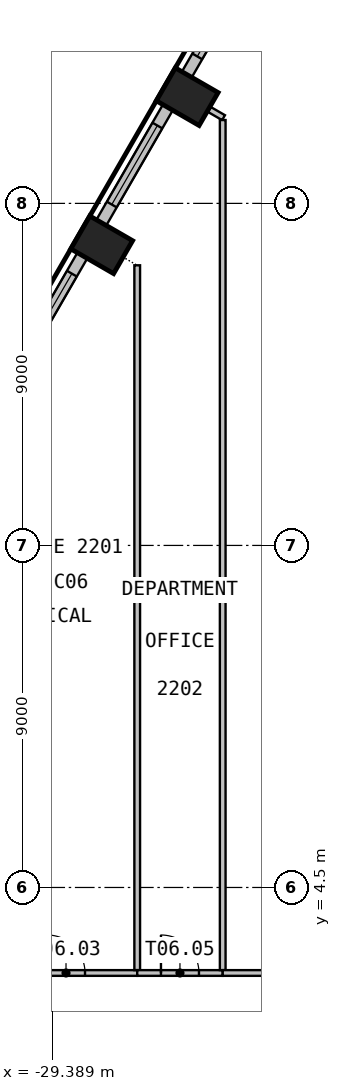
"""IFC4 building model, lengths in metres.
Left out: names, types, materials, properties, quantities, classifications, styles, units other than length and angle.
Written with IfcOpenShell. Run it as: python <this file> out.ifc"""

import sys

from ifc_helpers import new_model, si_unit, direction, frame, frame_2d, origin, origin_2d, place, context, subcontext, project, spatial, rectangle, extrude, element, fill, save


model = new_model("IFC4")
c1 = context("Model", 3, precision=1e-05, world=origin(), true_north=direction((0.0, 1.0)))
c2 = subcontext(c1, "Body", "Model", "MODEL_VIEW")
j1 = project(units=[si_unit("LENGTHUNIT", "METRE"), si_unit("PLANEANGLEUNIT", "RADIAN")], contexts=[c1])
p1 = place(None, origin())
s1 = spatial("IfcSite", under=j1, at=p1, CompositionType="ELEMENT")
p2 = place(p1, origin())
s2 = spatial("IfcBuilding", under=s1, at=p2, CompositionType="ELEMENT")
p3 = place(p2, frame((0.0, 0.0, 93.0)))
s3 = spatial("IfcBuildingStorey", under=s2, at=p3, CompositionType="ELEMENT", Elevation=93.0)
for number, where, z_axis, x_axis in (
    (1, (-25.834, 25.308, 0.0), (0.0, 0.0, 1.0), (-0.5, -0.866, 0.0)),
    (2, (-28.084, 21.411, 0.0), (0.0, 0.0, 1.0), (-0.5, -0.866, 0.0)),
):
    element("IfcColumn", number, at=place(p3, frame(where, z_axis=z_axis, x_axis=x_axis)), inside=s3, PredefinedType="COLUMN", context=c2, shape_type="SweptSolid", body=[
        extrude(rectangle(XDim=1.0, YDim=1.3, at=origin_2d()), origin(), (0.0, 0.0, 1.0), 3.525),
    ])
p4 = place(p3, frame((-24.248, 28.656, 0.0), z_axis=(0.0, 0.0, 1.0), x_axis=(-0.500004907028, -0.866022570692, 0.0)))
e3 = element("IfcWall", 3, at=p4, inside=s3, PredefinedType="SOLIDWALL", context=c2, shape_type="SweptSolid", body=[
    extrude(rectangle(XDim=3.192, YDim=0.3, at=frame_2d((1.596, 0.0))), origin(), (0.0, 0.0, 1.0), 3.525),
])
p5 = place(p4, frame((0.243, 0.0, 0.9)))
e4 = element("IfcOpeningElement", 4, at=p5, cuts=e3, PredefinedType="OPENING", context=c2, shape_type="SweptSolid", body=[
    extrude(rectangle(XDim=2.4, YDim=2.1, at=frame_2d((1.2, 1.05))), frame((0.0, 0.16, 0.0), z_axis=(0.0, -1.0, 0.0), x_axis=(1.0, 0.0, 0.0)), (0.0, 0.0, 1.0), 0.32),
])
p6 = place(p3, frame((-26.344, 25.024, 0.0), z_axis=(0.0, 0.0, 1.0), x_axis=(-0.499996256241, -0.866027565234, 0.0)))
e5 = element("IfcWall", 5, at=p6, inside=s3, PredefinedType="SOLIDWALL", context=c2, shape_type="SweptSolid", body=[
    extrude(rectangle(XDim=3.499, YDim=0.3, at=frame_2d((1.75, 0.0))), origin(), (0.0, 0.0, 1.0), 3.525),
])
p7 = place(p6, frame((0.55, 0.0, 0.9)))
e6 = element("IfcOpeningElement", 6, at=p7, cuts=e5, PredefinedType="OPENING", context=c2, shape_type="SweptSolid", body=[
    extrude(rectangle(XDim=2.4, YDim=2.1, at=frame_2d((1.2, 1.05))), frame((0.0, 0.16, 0.0), z_axis=(0.0, -1.0, 0.0), x_axis=(1.0, 0.0, 0.0)), (0.0, 0.0, 1.0), 0.32),
])
p8 = place(p3, frame((-28.594, 21.127, 0.0), z_axis=(0.0, 0.0, 1.0), x_axis=(-0.499996256241, -0.866027565234, 0.0)))
e7 = element("IfcWall", 7, at=p8, inside=s3, PredefinedType="SOLIDWALL", context=c2, shape_type="SweptSolid", body=[
    extrude(rectangle(XDim=3.499, YDim=0.3, at=frame_2d((1.75, 0.0))), origin(), (0.0, 0.0, 1.0), 3.525),
])
p9 = place(p8, frame((0.55, 0.0, 0.9)))
e8 = element("IfcOpeningElement", 8, at=p9, cuts=e7, PredefinedType="OPENING", context=c2, shape_type="SweptSolid", body=[
    extrude(rectangle(XDim=2.4, YDim=2.1, at=frame_2d((1.2, 1.05))), frame((0.0, 0.16, 0.0), z_axis=(0.0, -1.0, 0.0), x_axis=(1.0, 0.0, 0.0)), (0.0, 0.0, 1.0), 0.32),
])
p10 = place(p3, frame((-30.897, 2.25, 0.0), z_axis=(0.0, 0.0, 1.0), x_axis=(1.0, 0.0, 0.0)))
e9 = element("IfcWall", 9, at=p10, inside=s3, PredefinedType="PARTITIONING", context=c2, shape_type="SweptSolid", body=[
    extrude(rectangle(XDim=3.747, YDim=0.15, at=frame_2d((1.874, 0.0))), origin(), (0.0, 0.0, 1.0), 3.525),
])
p11 = place(p10, frame((1.374, 0.0, 0.0)))
e10 = element("IfcOpeningElement", 10, at=p11, cuts=e9, PredefinedType="OPENING", context=c2, shape_type="SweptSolid", body=[
    extrude(rectangle(XDim=1.0, YDim=2.1, at=frame_2d((0.5, 1.05))), frame((0.0, 0.085, 0.0), z_axis=(0.0, -1.0, 0.0), x_axis=(1.0, 0.0, 0.0)), (0.0, 0.0, 1.0), 0.17),
])
p12 = place(p3, frame((-27.15, 20.871, 0.0), z_axis=(0.0, 0.0, 1.0), x_axis=(0.0, -1.0, 0.0)))
e11 = element("IfcWall", 11, at=p12, inside=s3, PredefinedType="PARTITIONING", context=c2, shape_type="SweptSolid", body=[
    extrude(rectangle(XDim=18.546, YDim=0.15, at=frame_2d((9.273, 0.0))), origin(), (0.0, 0.0, 1.0), 3.525),
])
p13 = place(p3, frame((-27.15, 2.25, 0.0), z_axis=(0.0, 0.0, 1.0), x_axis=(1.0, 0.0, 0.0)))
e12 = element("IfcWall", 12, at=p13, inside=s3, PredefinedType="PARTITIONING", context=c2, shape_type="SweptSolid", body=[
    extrude(rectangle(XDim=2.25, YDim=0.15, at=frame_2d((1.125, 0.0))), origin(), (0.0, 0.0, 1.0), 3.525),
])
p14 = place(p13, frame((0.625, 0.0, 0.0)))
e13 = element("IfcOpeningElement", 13, at=p14, cuts=e12, PredefinedType="OPENING", context=c2, shape_type="SweptSolid", body=[
    extrude(rectangle(XDim=1.0, YDim=2.1, at=frame_2d((0.5, 1.05))), frame((0.0, 0.085, 0.0), z_axis=(0.0, -1.0, 0.0), x_axis=(1.0, 0.0, 0.0)), (0.0, 0.0, 1.0), 0.17),
])
p15 = place(p3, frame((-25.254, 24.973, 0.0), z_axis=(0.0, 0.0, 1.0), x_axis=(0.865772940384, -0.500437024708, 0.0)))
e14 = element("IfcWall", 14, at=p15, inside=s3, PredefinedType="PARTITIONING", context=c2, shape_type="SweptSolid", body=[
    extrude(rectangle(XDim=0.434, YDim=0.15, at=frame_2d((0.217, 0.0))), origin(), (0.0, 0.0, 1.0), 3.525),
])
p16 = place(p3, frame((-24.9, 24.693, 0.0), z_axis=(0.0, 0.0, 1.0), x_axis=(0.0, -1.0, 0.0)))
e15 = element("IfcWall", 15, at=p16, inside=s3, PredefinedType="PARTITIONING", context=c2, shape_type="SweptSolid", body=[
    extrude(rectangle(XDim=22.368, YDim=0.15, at=frame_2d((11.184, 0.0))), origin(), (0.0, 0.0, 1.0), 3.525),
])
p17 = place(p3, frame((-24.9, 2.25, 0.0), z_axis=(0.0, 0.0, 1.0), x_axis=(1.0, 0.0, 0.0)))
e16 = element("IfcWall", 16, at=p17, inside=s3, PredefinedType="PARTITIONING", context=c2, shape_type="SweptSolid", body=[
    extrude(rectangle(XDim=4.575, YDim=0.15, at=frame_2d((2.288, 0.0))), origin(), (0.0, 0.0, 1.0), 3.525),
])
p18 = place(p5, origin())
e17 = element("IfcWindow", 17, at=p18, inside=s3, PartitioningType="SINGLE_PANEL", PredefinedType="WINDOW", context=c2, shape_type="SweptSolid", body=[
    extrude(rectangle(XDim=2.4, YDim=2.1, at=frame_2d((1.2, 1.05))), frame((0.0, 0.03, 0.0), z_axis=(0.0, -1.0, 0.0), x_axis=(1.0, 0.0, 0.0)), (0.0, 0.0, 1.0), 0.06),
])
fill(e4, e17)
p19 = place(p7, origin())
e18 = element("IfcWindow", 18, at=p19, inside=s3, PartitioningType="SINGLE_PANEL", PredefinedType="WINDOW", context=c2, shape_type="SweptSolid", body=[
    extrude(rectangle(XDim=2.4, YDim=2.1, at=frame_2d((1.2, 1.05))), frame((0.0, 0.03, 0.0), z_axis=(0.0, -1.0, 0.0), x_axis=(1.0, 0.0, 0.0)), (0.0, 0.0, 1.0), 0.06),
])
fill(e6, e18)
p20 = place(p9, origin())
e19 = element("IfcWindow", 19, at=p20, inside=s3, PartitioningType="SINGLE_PANEL", PredefinedType="WINDOW", context=c2, shape_type="SweptSolid", body=[
    extrude(rectangle(XDim=2.4, YDim=2.1, at=frame_2d((1.2, 1.05))), frame((0.0, 0.03, 0.0), z_axis=(0.0, -1.0, 0.0), x_axis=(1.0, 0.0, 0.0)), (0.0, 0.0, 1.0), 0.06),
])
fill(e8, e19)
p21 = place(p11, origin())
e20 = element("IfcDoor", 20, at=p21, inside=s3, OperationType="SINGLE_SWING_RIGHT", PredefinedType="DOOR", context=c2, shape_type="SweptSolid", body=[
    extrude(rectangle(XDim=1.0, YDim=2.1, at=frame_2d((0.5, 1.05))), frame((0.0, 0.025, 0.0), z_axis=(0.0, -1.0, 0.0), x_axis=(1.0, 0.0, 0.0)), (0.0, 0.0, 1.0), 0.05),
])
fill(e10, e20)
p22 = place(p14, origin())
e21 = element("IfcDoor", 21, at=p22, inside=s3, OperationType="SINGLE_SWING_LEFT", PredefinedType="DOOR", context=c2, shape_type="SweptSolid", body=[
    extrude(rectangle(XDim=1.0, YDim=2.1, at=frame_2d((0.5, 1.05))), frame((0.0, 0.025, 0.0), z_axis=(0.0, -1.0, 0.0), x_axis=(1.0, 0.0, 0.0)), (0.0, 0.0, 1.0), 0.05),
])
fill(e13, e21)
save(model, sys.argv[1])
